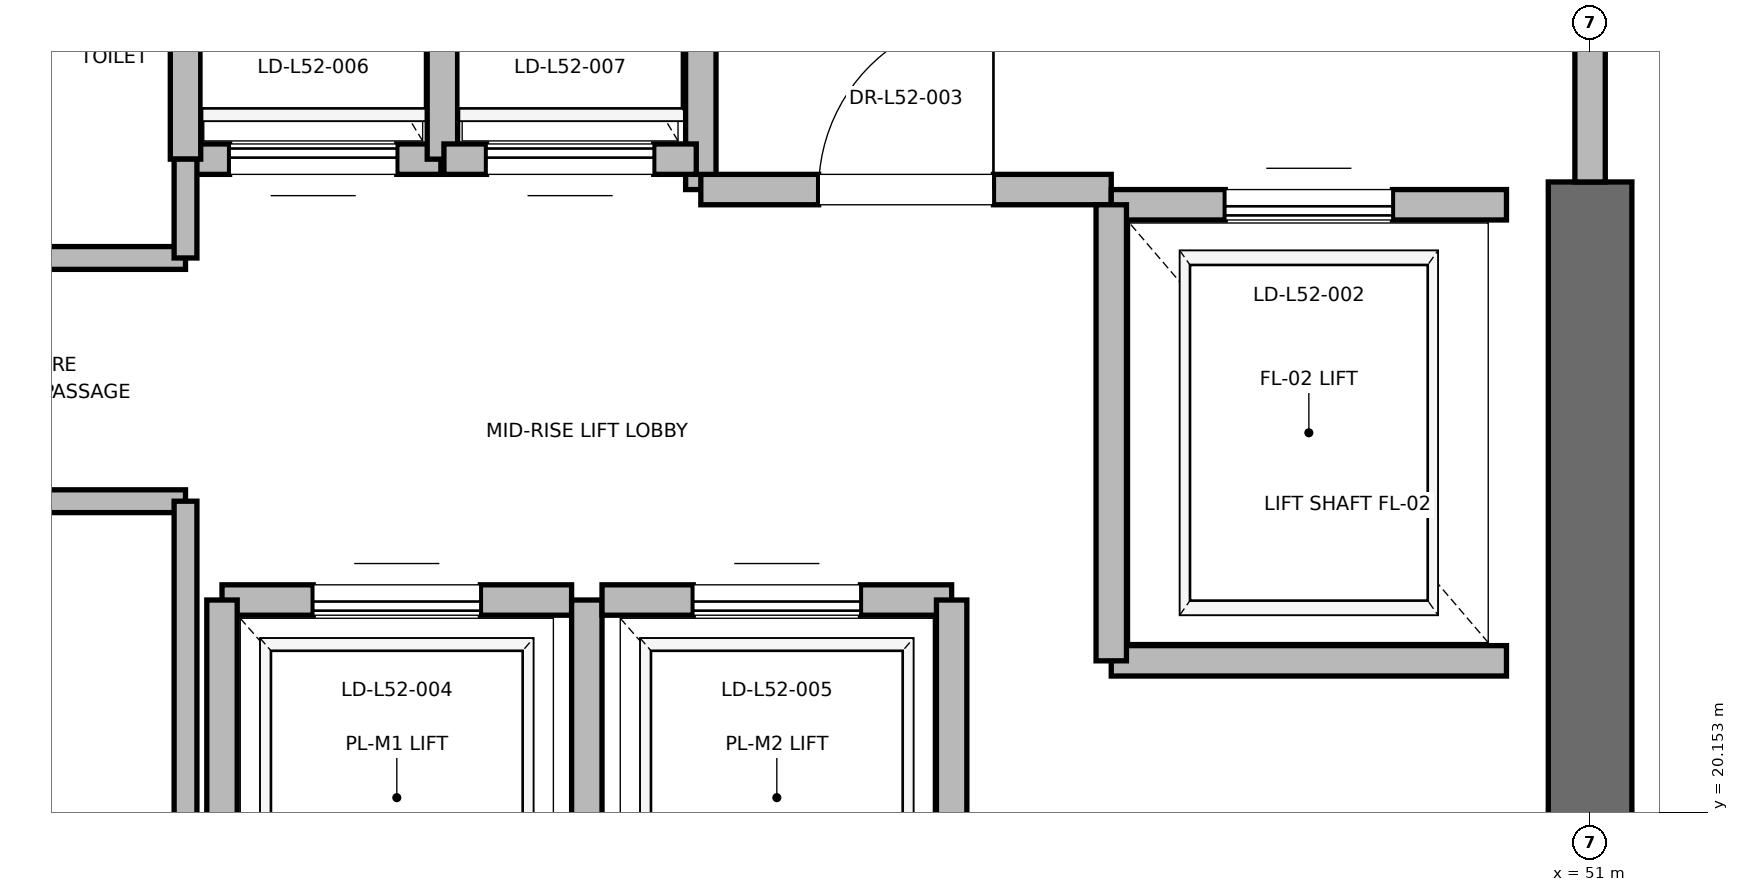
"""IFC4 building model, lengths in metres.
Left out: names, types, materials, properties, quantities, classifications, styles, units other than length and angle.
Written with IfcOpenShell. Run it as: python <this file> out.ifc"""

import sys

from ifc_helpers import new_model, si_unit, direction, frame, frame_2d, origin, place, context, subcontext, project, spatial, rectangle, extrude, element, fill, save


model = new_model("IFC4")
c1 = context("Model", 3, precision=1e-05, world=origin(), true_north=direction((0.0, 1.0)))
c2 = subcontext(c1, "Body", "Model", "MODEL_VIEW")
j1 = project(units=[si_unit("LENGTHUNIT", "METRE"), si_unit("PLANEANGLEUNIT", "RADIAN")], contexts=[c1])
p1 = place(None, origin())
s1 = spatial("IfcSite", under=j1, at=p1, CompositionType="ELEMENT")
p2 = place(p1, origin())
s2 = spatial("IfcBuilding", under=s1, at=p2, CompositionType="ELEMENT")
p3 = place(p2, frame((0.0, 0.0, 225.2)))
s3 = spatial("IfcBuildingStorey", under=s2, at=p3, CompositionType="ELEMENT", Elevation=225.2)
p4 = place(p3, frame((51.0, 18.5, 0.0), z_axis=(0.0, 0.0, 1.0), x_axis=(0.0, 1.0, 0.0)))
e1 = element("IfcWall", 1, at=p4, inside=s3, PredefinedType="SHEAR", context=c2, shape_type="SweptSolid", body=[
    extrude(rectangle(XDim=5.8, YDim=0.55, at=frame_2d((2.9, 0.0))), origin(), (0.0, 0.0, 1.0), 3.775),
])
p5 = place(p3, frame((45.15, 24.25, 0.0), z_axis=(0.0, 0.0, 1.0), x_axis=(0.0, 1.0, 0.0)))
e2 = element("IfcWall", 2, at=p5, inside=s3, PredefinedType="PARTITIONING", context=c2, shape_type="SweptSolid", body=[
    extrude(rectangle(XDim=3.37, YDim=0.2, at=frame_2d((1.685, 0.0))), origin(), (0.0, 0.0, 1.0), 3.775),
])
p6 = place(p3, frame((45.15, 24.25, 0.0), z_axis=(0.0, 0.0, 1.0), x_axis=(1.0, 0.0, 0.0)))
e3 = element("IfcWall", 3, at=p6, inside=s3, PredefinedType="PARTITIONING", context=c2, shape_type="SweptSolid", body=[
    extrude(rectangle(XDim=2.7, YDim=0.2, at=frame_2d((1.35, 0.0))), origin(), (0.0, 0.0, 1.0), 3.775),
])
p7 = place(p6, frame((0.775, 0.0, 0.0)))
e4 = element("IfcOpeningElement", 4, at=p7, cuts=e3, PredefinedType="OPENING", context=c2, shape_type="SweptSolid", body=[
    extrude(rectangle(XDim=1.15, YDim=2.2, at=frame_2d((0.575, 1.1))), frame((0.0, 0.1, 0.0), z_axis=(0.0, -1.0, 0.0), x_axis=(1.0, 0.0, 0.0)), (0.0, 0.0, 1.0), 0.2),
])
p8 = place(p3, frame((51.0, 24.3, 0.0), z_axis=(0.0, 0.0, 1.0), x_axis=(0.0, 1.0, 0.0)))
e5 = element("IfcWall", 5, at=p8, inside=s3, PredefinedType="PARTITIONING", context=c2, shape_type="SweptSolid", body=[
    extrude(rectangle(XDim=3.4, YDim=0.2, at=frame_2d((1.7, 0.0))), origin(), (0.0, 0.0, 1.0), 2.755),
])
p9 = place(p8, frame((1.125, 0.0, 0.0)))
e6 = element("IfcOpeningElement", 6, at=p9, cuts=e5, PredefinedType="OPENING", context=c2, shape_type="SweptSolid", body=[
    extrude(rectangle(XDim=1.15, YDim=2.2, at=frame_2d((0.575, 1.1))), frame((0.0, 0.1, 0.0), z_axis=(0.0, -1.0, 0.0), x_axis=(1.0, 0.0, 0.0)), (0.0, 0.0, 1.0), 0.2),
])
p10 = place(p3, frame((47.85, 21.15, 0.0), z_axis=(0.0, 0.0, 1.0), x_axis=(1.0, 0.0, 0.0)))
e7 = element("IfcWall", 7, at=p10, inside=s3, PredefinedType="SOLIDWALL", context=c2, shape_type="SweptSolid", body=[
    extrude(rectangle(XDim=2.6, YDim=0.2, at=frame_2d((1.3, 0.0))), origin(), (0.0, 0.0, 1.0), 3.775),
])
p11 = place(p3, frame((50.45, 24.15, 0.0), z_axis=(0.0, 0.0, 1.0), x_axis=(-1.0, 0.0, 0.0)))
e8 = element("IfcWall", 8, at=p11, inside=s3, PredefinedType="SOLIDWALL", context=c2, shape_type="SweptSolid", body=[
    extrude(rectangle(XDim=2.6, YDim=0.2, at=frame_2d((1.3, 0.0))), origin(), (0.0, 0.0, 1.0), 2.755),
])
p12 = place(p11, frame((0.75, 0.0, 0.0)))
e9 = element("IfcOpeningElement", 9, at=p12, cuts=e8, PredefinedType="OPENING", context=c2, shape_type="SweptSolid", body=[
    extrude(rectangle(XDim=1.1, YDim=2.2, at=frame_2d((0.55, 1.1))), frame((0.0, 0.1, 0.0), z_axis=(0.0, -1.0, 0.0), x_axis=(1.0, 0.0, 0.0)), (0.0, 0.0, 1.0), 0.2),
])
p13 = place(p3, frame((47.85, 24.15, 0.0), z_axis=(0.0, 0.0, 1.0), x_axis=(0.0, -1.0, 0.0)))
e10 = element("IfcWall", 10, at=p13, inside=s3, PredefinedType="SOLIDWALL", context=c2, shape_type="SweptSolid", body=[
    extrude(rectangle(XDim=3.0, YDim=0.2, at=frame_2d((1.5, 0.0))), origin(), (0.0, 0.0, 1.0), 3.775),
])
p14 = place(p3, frame((44.3, 21.55, 0.0), z_axis=(0.0, 0.0, 1.0), x_axis=(-1.0, 0.0, 0.0)))
e11 = element("IfcWall", 11, at=p14, inside=s3, PredefinedType="SOLIDWALL", context=c2, shape_type="SweptSolid", body=[
    extrude(rectangle(XDim=2.3, YDim=0.2, at=frame_2d((1.15, 0.0))), origin(), (0.0, 0.0, 1.0), 3.775),
])
p15 = place(p14, frame((0.6, 0.0, 0.0)))
e12 = element("IfcOpeningElement", 12, at=p15, cuts=e11, PredefinedType="OPENING", context=c2, shape_type="SweptSolid", body=[
    extrude(rectangle(XDim=1.1, YDim=2.2, at=frame_2d((0.55, 1.1))), frame((0.0, 0.1, 0.0), z_axis=(0.0, -1.0, 0.0), x_axis=(1.0, 0.0, 0.0)), (0.0, 0.0, 1.0), 0.2),
])
p16 = place(p3, frame((42.0, 21.55, 0.0), z_axis=(0.0, 0.0, 1.0), x_axis=(0.0, -1.0, 0.0)))
e13 = element("IfcWall", 13, at=p16, inside=s3, PredefinedType="SOLIDWALL", context=c2, shape_type="SweptSolid", body=[
    extrude(rectangle(XDim=2.6, YDim=0.2, at=frame_2d((1.3, 0.0))), origin(), (0.0, 0.0, 1.0), 2.755),
])
p17 = place(p3, frame((44.4, 18.95, 0.0), z_axis=(0.0, 0.0, 1.0), x_axis=(0.0, 1.0, 0.0)))
e14 = element("IfcWall", 14, at=p17, inside=s3, PredefinedType="SOLIDWALL", context=c2, shape_type="SweptSolid", body=[
    extrude(rectangle(XDim=2.6, YDim=0.2, at=frame_2d((1.3, 0.0))), origin(), (0.0, 0.0, 1.0), 3.775),
])
p18 = place(p3, frame((46.8, 21.55, 0.0), z_axis=(0.0, 0.0, 1.0), x_axis=(-1.0, 0.0, 0.0)))
e15 = element("IfcWall", 15, at=p18, inside=s3, PredefinedType="SOLIDWALL", context=c2, shape_type="SweptSolid", body=[
    extrude(rectangle(XDim=2.3, YDim=0.2, at=frame_2d((1.15, 0.0))), origin(), (0.0, 0.0, 1.0), 3.775),
])
p19 = place(p18, frame((0.6, 0.0, 0.0)))
e16 = element("IfcOpeningElement", 16, at=p19, cuts=e15, PredefinedType="OPENING", context=c2, shape_type="SweptSolid", body=[
    extrude(rectangle(XDim=1.1, YDim=2.2, at=frame_2d((0.55, 1.1))), frame((0.0, 0.1, 0.0), z_axis=(0.0, -1.0, 0.0), x_axis=(1.0, 0.0, 0.0)), (0.0, 0.0, 1.0), 0.2),
])
p20 = place(p3, frame((46.8, 18.95, 0.0), z_axis=(0.0, 0.0, 1.0), x_axis=(0.0, 1.0, 0.0)))
e17 = element("IfcWall", 17, at=p20, inside=s3, PredefinedType="SOLIDWALL", context=c2, shape_type="SweptSolid", body=[
    extrude(rectangle(XDim=2.6, YDim=0.2, at=frame_2d((1.3, 0.0))), origin(), (0.0, 0.0, 1.0), 3.775),
])
p21 = place(p3, frame((41.76, 24.45, 0.0), z_axis=(0.0, 0.0, 1.0), x_axis=(1.0, 0.0, 0.0)))
e18 = element("IfcWall", 18, at=p21, inside=s3, PredefinedType="SOLIDWALL", context=c2, shape_type="SweptSolid", body=[
    extrude(rectangle(XDim=1.68, YDim=0.2, at=frame_2d((0.84, 0.0))), origin(), (0.0, 0.0, 1.0), 3.775),
])
p22 = place(p21, frame((0.29, 0.0, 0.0)))
e19 = element("IfcOpeningElement", 19, at=p22, cuts=e18, PredefinedType="OPENING", context=c2, shape_type="SweptSolid", body=[
    extrude(rectangle(XDim=1.1, YDim=2.2, at=frame_2d((0.55, 1.1))), frame((0.0, 0.1, 0.0), z_axis=(0.0, -1.0, 0.0), x_axis=(1.0, 0.0, 0.0)), (0.0, 0.0, 1.0), 0.2),
])
for number, where, z_axis, x_axis in (
    (20, (41.76, 27.05, 0.0), (0.0, 0.0, 1.0), (0.0, -1.0, 0.0)),
    (21, (43.45, 24.45, 0.0), (0.0, 0.0, 1.0), (0.0, 1.0, 0.0)),
):
    element("IfcWall", number, at=place(p3, frame(where, z_axis=z_axis, x_axis=x_axis)), inside=s3, PredefinedType="SOLIDWALL", context=c2, shape_type="SweptSolid", body=[
        extrude(rectangle(XDim=2.6, YDim=0.2, at=frame_2d((1.3, 0.0))), origin(), (0.0, 0.0, 1.0), 3.775),
    ])
p23 = place(p3, frame((43.46, 24.45, 0.0), z_axis=(0.0, 0.0, 1.0), x_axis=(1.0, 0.0, 0.0)))
e22 = element("IfcWall", 22, at=p23, inside=s3, PredefinedType="SOLIDWALL", context=c2, shape_type="SweptSolid", body=[
    extrude(rectangle(XDim=1.66, YDim=0.2, at=frame_2d((0.83, 0.0))), origin(), (0.0, 0.0, 1.0), 3.775),
])
p24 = place(p23, frame((0.28, 0.0, 0.0)))
e23 = element("IfcOpeningElement", 23, at=p24, cuts=e22, PredefinedType="OPENING", context=c2, shape_type="SweptSolid", body=[
    extrude(rectangle(XDim=1.1, YDim=2.2, at=frame_2d((0.55, 1.1))), frame((0.0, 0.1, 0.0), z_axis=(0.0, -1.0, 0.0), x_axis=(1.0, 0.0, 0.0)), (0.0, 0.0, 1.0), 0.2),
])
for number, where, z_axis, x_axis in (
    (24, (39.95, 22.2, 0.0), (0.0, 0.0, 1.0), (1.0, 0.0, 0.0)),
    (25, (39.95, 23.8, 0.0), (0.0, 0.0, 1.0), (1.0, 0.0, 0.0)),
):
    element("IfcWall", number, at=place(p3, frame(where, z_axis=z_axis, x_axis=x_axis)), inside=s3, PredefinedType="PARTITIONING", context=c2, shape_type="SweptSolid", body=[
        extrude(rectangle(XDim=1.81, YDim=0.15, at=frame_2d((0.905, 0.0))), origin(), (0.0, 0.0, 1.0), 2.85),
    ])
p25 = place(p3, frame((41.76, 18.6, 0.0), z_axis=(0.0, 0.0, 1.0), x_axis=(0.0, 1.0, 0.0)))
e26 = element("IfcWall", 26, at=p25, inside=s3, PredefinedType="PARTITIONING", context=c2, shape_type="SweptSolid", body=[
    extrude(rectangle(XDim=3.6, YDim=0.15, at=frame_2d((1.8, 0.0))), origin(), (0.0, 0.0, 1.0), 2.755),
])
p26 = place(p3, frame((41.76, 23.8, 0.0), z_axis=(0.0, 0.0, 1.0), x_axis=(0.0, 1.0, 0.0)))
e27 = element("IfcWall", 27, at=p26, inside=s3, PredefinedType="PARTITIONING", context=c2, shape_type="SweptSolid", body=[
    extrude(rectangle(XDim=0.65, YDim=0.15, at=frame_2d((0.325, 0.0))), origin(), (0.0, 0.0, 1.0), 2.85),
])
p27 = place(p7, origin())
e28 = element("IfcDoor", 28, at=p27, inside=s3, OperationType="SINGLE_SWING_RIGHT", PredefinedType="DOOR", context=c2, shape_type="SweptSolid", body=[
    extrude(rectangle(XDim=1.15, YDim=2.2, at=frame_2d((0.575, 1.1))), frame((0.0, 0.025, 0.0), z_axis=(0.0, -1.0, 0.0), x_axis=(1.0, 0.0, 0.0)), (0.0, 0.0, 1.0), 0.05),
])
fill(e4, e28)
p28 = place(p12, origin())
e29 = element("IfcDoor", 29, at=p28, inside=s3, OperationType="SLIDING_TO_RIGHT", PredefinedType="DOOR", context=c2, shape_type="SweptSolid", body=[
    extrude(rectangle(XDim=1.1, YDim=2.2, at=frame_2d((0.55, 1.1))), frame((0.0, 0.025, 0.0), z_axis=(0.0, -1.0, 0.0), x_axis=(1.0, 0.0, 0.0)), (0.0, 0.0, 1.0), 0.05),
])
fill(e9, e29)
p29 = place(p15, origin())
e30 = element("IfcDoor", 30, at=p29, inside=s3, OperationType="SLIDING_TO_RIGHT", PredefinedType="DOOR", context=c2, shape_type="SweptSolid", body=[
    extrude(rectangle(XDim=1.1, YDim=2.2, at=frame_2d((0.55, 1.1))), frame((0.0, 0.025, 0.0), z_axis=(0.0, -1.0, 0.0), x_axis=(1.0, 0.0, 0.0)), (0.0, 0.0, 1.0), 0.05),
])
fill(e12, e30)
p30 = place(p19, origin())
e31 = element("IfcDoor", 31, at=p30, inside=s3, OperationType="SLIDING_TO_RIGHT", PredefinedType="DOOR", context=c2, shape_type="SweptSolid", body=[
    extrude(rectangle(XDim=1.1, YDim=2.2, at=frame_2d((0.55, 1.1))), frame((0.0, 0.025, 0.0), z_axis=(0.0, -1.0, 0.0), x_axis=(1.0, 0.0, 0.0)), (0.0, 0.0, 1.0), 0.05),
])
fill(e16, e31)
p31 = place(p22, origin())
e32 = element("IfcDoor", 32, at=p31, inside=s3, OperationType="SLIDING_TO_RIGHT", PredefinedType="DOOR", context=c2, shape_type="SweptSolid", body=[
    extrude(rectangle(XDim=1.1, YDim=2.2, at=frame_2d((0.55, 1.1))), frame((0.0, 0.025, 0.0), z_axis=(0.0, -1.0, 0.0), x_axis=(1.0, 0.0, 0.0)), (0.0, 0.0, 1.0), 0.05),
])
fill(e19, e32)
p32 = place(p24, origin())
e33 = element("IfcDoor", 33, at=p32, inside=s3, OperationType="SLIDING_TO_RIGHT", PredefinedType="DOOR", context=c2, shape_type="SweptSolid", body=[
    extrude(rectangle(XDim=1.1, YDim=2.2, at=frame_2d((0.55, 1.1))), frame((0.0, 0.025, 0.0), z_axis=(0.0, -1.0, 0.0), x_axis=(1.0, 0.0, 0.0)), (0.0, 0.0, 1.0), 0.05),
])
fill(e23, e33)
save(model, sys.argv[1])
